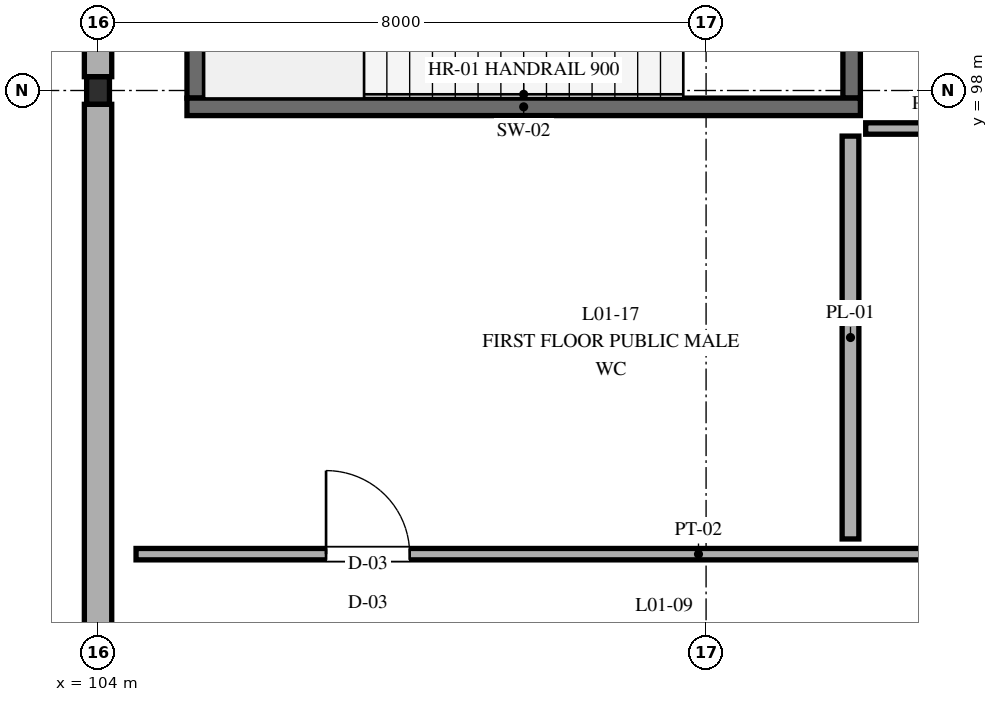
"""IFC4 building model, lengths in metres.
Left out: names, types, materials, properties, quantities, classifications, styles, units other than length and angle.
Written with IfcOpenShell. Run it as: python <this file> out.ifc"""

import sys

from ifc_helpers import new_model, si_unit, direction, frame, frame_2d, origin, origin_2d, place, context, subcontext, project, spatial, rectangle, i_section, extrude, element, fill, save


model = new_model("IFC4")
c1 = context("Model", 3, precision=1e-05, world=origin(), true_north=direction((0.0, 1.0)))
c2 = subcontext(c1, "Body", "Model", "MODEL_VIEW")
j1 = project(units=[si_unit("LENGTHUNIT", "METRE"), si_unit("PLANEANGLEUNIT", "RADIAN")], contexts=[c1])
p1 = place(None, origin())
s1 = spatial("IfcSite", under=j1, at=p1, CompositionType="ELEMENT")
p2 = place(p1, origin())
s2 = spatial("IfcBuilding", under=s1, at=p2, CompositionType="ELEMENT")
p3 = place(p2, frame((0.0, 0.0, 4.8)))
s3 = spatial("IfcBuildingStorey", under=s2, at=p3, CompositionType="ELEMENT", Elevation=4.8)
p4 = place(p3, frame((104.0, 98.0, 0.0), z_axis=(0.0, 0.0, 1.0), x_axis=(1.0, 0.0, 0.0)))
e1 = element("IfcColumn", 1, at=p4, inside=s3, PredefinedType="COLUMN", context=c2, shape_type="SweptSolid", body=[
    extrude(i_section(OverallWidth=0.3, OverallDepth=0.36, WebThickness=0.012, FlangeThickness=0.022, FilletRadius=0.027, at=origin_2d()), origin(), (0.0, 0.0, 1.0), 4.8),
])
for number, where, z_axis, x_axis in (
    (2, (104.0, 97.818, 0.0), (0.0, 0.0, 1.0), (0.0, -1.0, 0.0)),
    (3, (104.0, 105.818, 0.0), (0.0, 0.0, 1.0), (0.0, -1.0, 0.0)),
):
    element("IfcWall", number, at=place(p3, frame(where, z_axis=z_axis, x_axis=x_axis)), inside=s3, PredefinedType="STANDARD", context=c2, shape_type="SweptSolid", body=[
        extrude(rectangle(XDim=7.636, YDim=0.36, at=frame_2d((3.818, 0.0))), origin(), (0.0, 0.0, 1.0), 4.25),
    ])
p5 = place(p3, frame((113.915, 97.9, 0.0), z_axis=(0.0, 0.0, 1.0), x_axis=(0.0, 1.0, 0.0)))
e4 = element("IfcWall", 4, at=p5, inside=s3, PredefinedType="SHEAR", context=c2, shape_type="SweptSolid", body=[
    extrude(rectangle(XDim=4.3, YDim=0.23, at=frame_2d((2.15, 0.0))), origin(), (0.0, 0.0, 1.0), 4.8),
])
p6 = place(p5, frame((1.425, 0.0, 0.0)))
e5 = element("IfcOpeningElement", 5, at=p6, cuts=e4, PredefinedType="OPENING", context=c2, shape_type="SweptSolid", body=[
    extrude(rectangle(XDim=1.45, YDim=2.2, at=frame_2d((0.725, 1.1))), frame((0.0, 0.125, 0.0), z_axis=(0.0, -1.0, 0.0), x_axis=(1.0, 0.0, 0.0)), (0.0, 0.0, 1.0), 0.25),
])
p7 = place(p3, frame((105.285, 102.2, 0.0), z_axis=(0.0, 0.0, 1.0), x_axis=(0.0, -1.0, 0.0)))
e6 = element("IfcWall", 6, at=p7, inside=s3, PredefinedType="SHEAR", context=c2, shape_type="SweptSolid", body=[
    extrude(rectangle(XDim=4.3, YDim=0.23, at=frame_2d((2.15, 0.0))), origin(), (0.0, 0.0, 1.0), 4.8),
])
p8 = place(p3, frame((105.17, 97.785, 0.0), z_axis=(0.0, 0.0, 1.0), x_axis=(1.0, 0.0, 0.0)))
e7 = element("IfcWall", 7, at=p8, inside=s3, PredefinedType="SHEAR", context=c2, shape_type="SweptSolid", body=[
    extrude(rectangle(XDim=8.86, YDim=0.23, at=frame_2d((4.43, 0.0))), origin(), (0.0, 0.0, 1.0), 4.8),
])
p9 = place(p3, frame((104.5, 91.9, 0.0), z_axis=(0.0, 0.0, 1.0), x_axis=(1.0, 0.0, 0.0)))
e8 = element("IfcWall", 8, at=p9, inside=s3, PredefinedType="PARTITIONING", context=c2, shape_type="SweptSolid", body=[
    extrude(rectangle(XDim=55.0, YDim=0.15, at=frame_2d((27.5, 0.0))), origin(), (0.0, 0.0, 1.0), 3.95),
])
p10 = place(p9, frame((2.5, 0.0, 0.0)))
e9 = element("IfcOpeningElement", 9, at=p10, cuts=e8, PredefinedType="OPENING", context=c2, shape_type="SweptSolid", body=[
    extrude(rectangle(XDim=1.1, YDim=2.2, at=frame_2d((0.55, 1.1))), frame((0.0, 0.085, 0.0), z_axis=(0.0, -1.0, 0.0), x_axis=(1.0, 0.0, 0.0)), (0.0, 0.0, 1.0), 0.17),
])
p11 = place(p9, frame((11.2, 0.0, 0.0)))
e10 = element("IfcOpeningElement", 10, at=p11, cuts=e8, PredefinedType="OPENING", context=c2, shape_type="SweptSolid", body=[
    extrude(rectangle(XDim=1.05, YDim=2.15, at=frame_2d((0.525, 1.075))), frame((0.0, 0.085, 0.0), z_axis=(0.0, -1.0, 0.0), x_axis=(1.0, 0.0, 0.0)), (0.0, 0.0, 1.0), 0.17),
])
p12 = place(p9, frame((24.0, 0.0, 0.0)))
e11 = element("IfcOpeningElement", 11, at=p12, cuts=e8, PredefinedType="OPENING", context=c2, shape_type="SweptSolid", body=[
    extrude(rectangle(XDim=1.1, YDim=2.2, at=frame_2d((0.55, 1.1))), frame((0.0, 0.085, 0.0), z_axis=(0.0, -1.0, 0.0), x_axis=(1.0, 0.0, 0.0)), (0.0, 0.0, 1.0), 0.17),
])
p13 = place(p9, frame((40.5, 0.0, 0.0)))
e12 = element("IfcOpeningElement", 12, at=p13, cuts=e8, PredefinedType="OPENING", context=c2, shape_type="SweptSolid", body=[
    extrude(rectangle(XDim=1.0, YDim=2.15, at=frame_2d((0.5, 1.075))), frame((0.0, 0.085, 0.0), z_axis=(0.0, -1.0, 0.0), x_axis=(1.0, 0.0, 0.0)), (0.0, 0.0, 1.0), 0.17),
])
p14 = place(p9, frame((49.0, 0.0, 0.0)))
e13 = element("IfcOpeningElement", 13, at=p14, cuts=e8, PredefinedType="OPENING", context=c2, shape_type="SweptSolid", body=[
    extrude(rectangle(XDim=1.35, YDim=2.2, at=frame_2d((0.675, 1.1))), frame((0.0, 0.085, 0.0), z_axis=(0.0, -1.0, 0.0), x_axis=(1.0, 0.0, 0.0)), (0.0, 0.0, 1.0), 0.17),
])
p15 = place(p3, frame((114.1, 97.5, 0.0), z_axis=(0.0, 0.0, 1.0), x_axis=(1.0, 0.0, 0.0)))
e14 = element("IfcWall", 14, at=p15, inside=s3, PredefinedType="PARTITIONING", context=c2, shape_type="SweptSolid", body=[
    extrude(rectangle(XDim=5.8, YDim=0.15, at=frame_2d((2.9, 0.0))), origin(), (0.0, 0.0, 1.0), 3.95),
])
p16 = place(p15, frame((2.2, 0.0, 0.0)))
e15 = element("IfcOpeningElement", 15, at=p16, cuts=e14, PredefinedType="OPENING", context=c2, shape_type="SweptSolid", body=[
    extrude(rectangle(XDim=1.6, YDim=2.2, at=frame_2d((0.8, 1.1))), frame((0.0, 0.085, 0.0), z_axis=(0.0, -1.0, 0.0), x_axis=(1.0, 0.0, 0.0)), (0.0, 0.0, 1.0), 0.17),
])
p17 = place(p3, frame((113.9, 92.1, 0.0), z_axis=(0.0, 0.0, 1.0), x_axis=(0.0, 1.0, 0.0)))
e16 = element("IfcWall", 16, at=p17, inside=s3, PredefinedType="PLUMBINGWALL", context=c2, shape_type="SweptSolid", body=[
    extrude(rectangle(XDim=5.3, YDim=0.22, at=frame_2d((2.65, 0.0))), origin(), (0.0, 0.0, 1.0), 3.95),
])
p18 = place(p10, origin())
e17 = element("IfcDoor", 17, at=p18, inside=s3, OperationType="SINGLE_SWING_LEFT", PredefinedType="DOOR", context=c2, shape_type="SweptSolid", body=[
    extrude(rectangle(XDim=1.1, YDim=2.2, at=frame_2d((0.55, 1.1))), frame((0.0, 0.025, 0.0), z_axis=(0.0, -1.0, 0.0), x_axis=(1.0, 0.0, 0.0)), (0.0, 0.0, 1.0), 0.05),
])
fill(e9, e17)
save(model, sys.argv[1])
